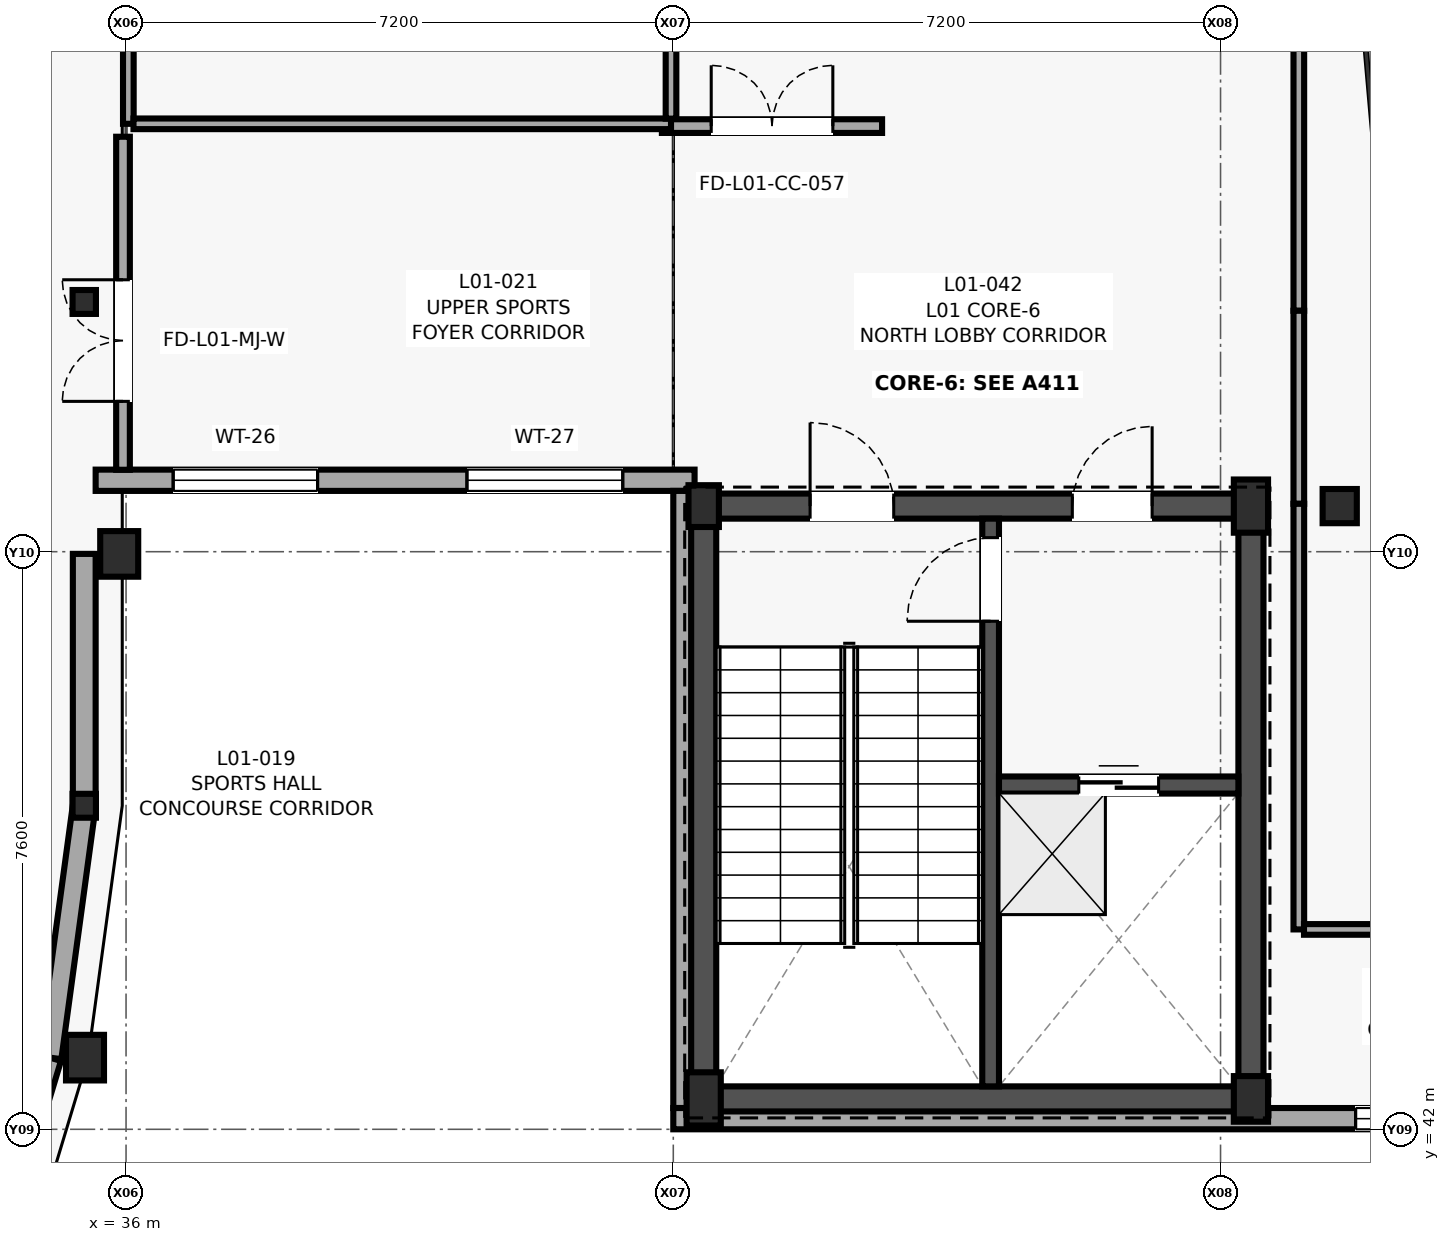
"""IFC4 building model, lengths in metres.
Left out: names, types, materials, properties, quantities, classifications, styles, units other than length and angle.
Written with IfcOpenShell. Run it as: python <this file> out.ifc"""

import sys

from ifc_helpers import new_model, si_unit, direction, frame, frame_2d, origin, origin_2d, place, context, subcontext, project, spatial, rectangle, circle, i_section, extrude, element, fill, save


model = new_model("IFC4")
c1 = context("Model", 3, precision=1e-05, world=origin(), true_north=direction((0.0, 1.0)))
c2 = subcontext(c1, "Body", "Model", "MODEL_VIEW")
j1 = project(units=[si_unit("LENGTHUNIT", "METRE"), si_unit("PLANEANGLEUNIT", "RADIAN")], contexts=[c1])
p1 = place(None, origin())
s1 = spatial("IfcSite", under=j1, at=p1, CompositionType="ELEMENT")
p2 = place(p1, origin())
s2 = spatial("IfcBuilding", under=s1, at=p2, CompositionType="ELEMENT")
p3 = place(p2, frame((0.0, 0.0, 4.2)))
s3 = spatial("IfcBuildingStorey", under=s2, at=p3, CompositionType="ELEMENT", Elevation=4.2)
for number, where, z_axis, x_axis in (
    (1, (35.45, 46.257, 0.0), (0.0, 0.0, 1.0), (1.0, 0.0, 0.0)),
    (2, (35.45, 52.886, 0.0), (0.0, 0.0, 1.0), (1.0, 0.0, 0.0)),
):
    element("IfcColumn", number, at=place(p3, frame(where, z_axis=z_axis, x_axis=x_axis)), inside=s3, PredefinedType="COLUMN", context=c2, shape_type="SweptSolid", body=[
        extrude(i_section(OverallWidth=0.307, OverallDepth=0.314, WebThickness=0.012, FlangeThickness=0.019, FilletRadius=0.015, at=origin_2d()), origin(), (0.0, 0.0, 1.0), 4.0),
    ])
for number, where, z_axis, x_axis in (
    (3, (35.46, 42.943, 0.0), (0.0, 0.0, 1.0), (1.0, 0.0, 0.0)),
    (4, (35.91, 49.571, 0.0), (0.0, 0.0, 1.0), (1.0, 0.0, 0.0)),
):
    element("IfcColumn", number, at=place(p3, frame(where, z_axis=z_axis, x_axis=x_axis)), inside=s3, PredefinedType="PILASTER", context=c2, shape_type="SweptSolid", body=[
        extrude(rectangle(XDim=0.5, YDim=0.6, at=origin_2d()), origin(), (0.0, 0.0, 1.0), 4.0),
    ])
p4 = place(p3, frame((43.6, 42.4, 0.0), z_axis=(0.0, 0.0, 1.0), x_axis=(1.0, 0.0, 0.0)))
e5 = element("IfcColumn", 5, at=p4, inside=s3, PredefinedType="COLUMN", context=c2, shape_type="SweptSolid", body=[
    extrude(rectangle(XDim=0.45, YDim=0.7, at=origin_2d()), origin(), (0.0, 0.0, 1.0), 4.0),
])
p5 = place(p3, frame((43.6, 50.2, 0.0), z_axis=(0.0, 0.0, 1.0), x_axis=(1.0, 0.0, 0.0)))
e6 = element("IfcColumn", 6, at=p5, inside=s3, PredefinedType="COLUMN", context=c2, shape_type="SweptSolid", body=[
    extrude(rectangle(XDim=0.4, YDim=0.55, at=origin_2d()), origin(), (0.0, 0.0, 1.0), 4.0),
])
p6 = place(p3, frame((50.8, 42.4, 0.0), z_axis=(0.0, 0.0, 1.0), x_axis=(1.0, 0.0, 0.0)))
e7 = element("IfcColumn", 7, at=p6, inside=s3, PredefinedType="COLUMN", context=c2, shape_type="SweptSolid", body=[
    extrude(rectangle(XDim=0.45, YDim=0.6, at=origin_2d()), origin(), (0.0, 0.0, 1.0), 4.0),
])
p7 = place(p3, frame((50.8, 50.2, 0.0), z_axis=(0.0, 0.0, 1.0), x_axis=(1.0, 0.0, 0.0)))
e8 = element("IfcColumn", 8, at=p7, inside=s3, PredefinedType="COLUMN", context=c2, shape_type="SweptSolid", body=[
    extrude(rectangle(XDim=0.45, YDim=0.7, at=origin_2d()), origin(), (0.0, 0.0, 1.0), 4.0),
])
p8 = place(p3, frame((51.968, 50.2, 0.0), z_axis=(0.0, 0.0, 1.0), x_axis=(1.0, 0.0, 0.0)))
e9 = element("IfcColumn", 9, at=p8, inside=s3, PredefinedType="COLUMN", context=c2, shape_type="SweptSolid", body=[
    extrude(circle(Radius=0.225, at=origin_2d()), origin(), (0.0, 0.0, 1.0), 4.0),
])
p9 = place(p3, frame((34.0, 39.629, 0.0), z_axis=(0.0, 0.0, 1.0), x_axis=(0.288868004026, 0.957368934241, 0.0)))
e10 = element("IfcWall", 10, at=p9, inside=s3, PredefinedType="SOLIDWALL", context=c2, shape_type="SweptSolid", body=[
    extrude(rectangle(XDim=3.462, YDim=0.3, at=frame_2d((1.731, 0.0))), origin(), (0.0, 0.0, 1.0), 3.745),
])
p10 = place(p3, frame((35.0, 42.943, 0.0), z_axis=(0.0, 0.0, 1.0), x_axis=(0.134539839792, 0.990908185206, 0.0)))
e11 = element("IfcWall", 11, at=p10, inside=s3, PredefinedType="SOLIDWALL", context=c2, shape_type="SweptSolid", body=[
    extrude(rectangle(XDim=3.344, YDim=0.3, at=frame_2d((1.672, 0.0))), origin(), (0.0, 0.0, 1.0), 3.745),
])
p11 = place(p3, frame((35.45, 46.257, 0.0), z_axis=(0.0, 0.0, 1.0), x_axis=(0.0, 1.0, 0.0)))
e12 = element("IfcWall", 12, at=p11, inside=s3, PredefinedType="SOLIDWALL", context=c2, shape_type="SweptSolid", body=[
    extrude(rectangle(XDim=3.314, YDim=0.3, at=frame_2d((1.657, 0.0))), origin(), (0.0, 0.0, 1.0), 3.48),
])
p12 = place(p3, frame((35.6, 50.54, 0.0), z_axis=(0.0, 0.0, 1.0), x_axis=(1.0, 0.0, 0.0)))
e13 = element("IfcWall", 13, at=p12, inside=s3, PredefinedType="SOLIDWALL", context=c2, shape_type="SweptSolid", body=[
    extrude(rectangle(XDim=7.88, YDim=0.28, at=frame_2d((3.94, 0.0))), origin(), (0.0, 0.0, 1.0), 3.78),
])
p13 = place(p12, frame((1.02, 0.0, 0.85)))
e14 = element("IfcOpeningElement", 14, at=p13, cuts=e13, PredefinedType="OPENING", context=c2, shape_type="SweptSolid", body=[
    extrude(rectangle(XDim=1.9, YDim=1.65, at=frame_2d((0.95, 0.825))), frame((0.0, 0.15, 0.0), z_axis=(0.0, -1.0, 0.0), x_axis=(1.0, 0.0, 0.0)), (0.0, 0.0, 1.0), 0.3),
])
p14 = place(p12, frame((4.885, 0.0, 1.05)))
e15 = element("IfcOpeningElement", 15, at=p14, cuts=e13, PredefinedType="OPENING", context=c2, shape_type="SweptSolid", body=[
    extrude(rectangle(XDim=2.05, YDim=1.55, at=frame_2d((1.025, 0.775))), frame((0.0, 0.15, 0.0), z_axis=(0.0, -1.0, 0.0), x_axis=(1.0, 0.0, 0.0)), (0.0, 0.0, 1.0), 0.3),
])
p15 = place(p3, frame((43.34, 50.4, 0.0), z_axis=(0.0, 0.0, 1.0), x_axis=(0.0, -1.0, 0.0)))
e16 = element("IfcWall", 16, at=p15, inside=s3, PredefinedType="SOLIDWALL", context=c2, shape_type="SweptSolid", body=[
    extrude(rectangle(XDim=8.12, YDim=0.28, at=frame_2d((4.06, 0.0))), origin(), (0.0, 0.0, 1.0), 3.78),
])
p16 = place(p3, frame((43.2, 42.14, 0.0), z_axis=(0.0, 0.0, 1.0), x_axis=(1.0, 0.0, 0.0)))
e17 = element("IfcWall", 17, at=p16, inside=s3, PredefinedType="SOLIDWALL", context=c2, shape_type="SweptSolid", body=[
    extrude(rectangle(XDim=12.093, YDim=0.28, at=frame_2d((6.046, 0.0))), origin(), (0.0, 0.0, 1.0), 3.78),
])
p17 = place(p16, frame((8.977, 0.0, 1.05)))
e18 = element("IfcOpeningElement", 18, at=p17, cuts=e17, PredefinedType="OPENING", context=c2, shape_type="SweptSolid", body=[
    extrude(rectangle(XDim=2.2, YDim=1.35, at=frame_2d((1.1, 0.675))), frame((0.0, 0.15, 0.0), z_axis=(0.0, -1.0, 0.0), x_axis=(1.0, 0.0, 0.0)), (0.0, 0.0, 1.0), 0.3),
])
p18 = place(p3, frame((43.435, 42.4, 0.0), z_axis=(0.0, 0.0, 1.0), x_axis=(1.0, 0.0, 0.0)))
e19 = element("IfcWall", 19, at=p18, inside=s3, PredefinedType="SHEAR", context=c2, shape_type="SweptSolid", body=[
    extrude(rectangle(XDim=7.53, YDim=0.33, at=frame_2d((3.765, 0.0))), origin(), (0.0, 0.0, 1.0), 3.78),
])
p19 = place(p3, frame((43.435, 50.2, 0.0), z_axis=(0.0, 0.0, 1.0), x_axis=(1.0, 0.0, 0.0)))
e20 = element("IfcWall", 20, at=p19, inside=s3, PredefinedType="SHEAR", context=c2, shape_type="SweptSolid", body=[
    extrude(rectangle(XDim=7.53, YDim=0.33, at=frame_2d((3.765, 0.0))), origin(), (0.0, 0.0, 1.0), 3.78),
])
p20 = place(p19, frame((5.015, 0.0, 0.0)))
e21 = element("IfcOpeningElement", 21, at=p20, cuts=e20, PredefinedType="OPENING", context=c2, shape_type="SweptSolid", body=[
    extrude(rectangle(XDim=1.05, YDim=2.15, at=frame_2d((0.525, 1.075))), frame((0.0, 0.175, 0.0), z_axis=(0.0, -1.0, 0.0), x_axis=(1.0, 0.0, 0.0)), (0.0, 0.0, 1.0), 0.35),
])
p21 = place(p19, frame((1.565, 0.0, 0.0)))
e22 = element("IfcOpeningElement", 22, at=p21, cuts=e20, PredefinedType="OPENING", context=c2, shape_type="SweptSolid", body=[
    extrude(rectangle(XDim=1.1, YDim=2.15, at=frame_2d((0.55, 1.075))), frame((0.0, 0.175, 0.0), z_axis=(0.0, -1.0, 0.0), x_axis=(1.0, 0.0, 0.0)), (0.0, 0.0, 1.0), 0.35),
])
for number, where, z_axis, x_axis in (
    (23, (43.6, 42.565, 0.0), (0.0, 0.0, 1.0), (0.0, 1.0, 0.0)),
    (24, (50.8, 42.565, 0.0), (0.0, 0.0, 1.0), (0.0, 1.0, 0.0)),
):
    element("IfcWall", number, at=place(p3, frame(where, z_axis=z_axis, x_axis=x_axis)), inside=s3, PredefinedType="SHEAR", context=c2, shape_type="SweptSolid", body=[
        extrude(rectangle(XDim=7.47, YDim=0.33, at=frame_2d((3.735, 0.0))), origin(), (0.0, 0.0, 1.0), 3.78),
    ])
p22 = place(p3, frame((47.375, 42.565, 0.0), z_axis=(0.0, 0.0, 1.0), x_axis=(0.0, 1.0, 0.0)))
e25 = element("IfcWall", 25, at=p22, inside=s3, PredefinedType="SHEAR", context=c2, shape_type="SweptSolid", body=[
    extrude(rectangle(XDim=7.47, YDim=0.22, at=frame_2d((3.735, 0.0))), origin(), (0.0, 0.0, 1.0), 3.78),
])
p23 = place(p22, frame((6.12, 0.0, 0.0)))
e26 = element("IfcOpeningElement", 26, at=p23, cuts=e25, PredefinedType="OPENING", context=c2, shape_type="SweptSolid", body=[
    extrude(rectangle(XDim=1.1, YDim=2.15, at=frame_2d((0.55, 1.075))), frame((0.0, 0.12, 0.0), z_axis=(0.0, -1.0, 0.0), x_axis=(1.0, 0.0, 0.0)), (0.0, 0.0, 1.0), 0.24),
])
p24 = place(p3, frame((47.485, 46.53, 0.0), z_axis=(0.0, 0.0, 1.0), x_axis=(1.0, 0.0, 0.0)))
e27 = element("IfcWall", 27, at=p24, inside=s3, PredefinedType="SHEAR", context=c2, shape_type="SweptSolid", body=[
    extrude(rectangle(XDim=3.15, YDim=0.225, at=frame_2d((1.575, 0.0))), origin(), (0.0, 0.0, 1.0), 3.78),
])
p25 = place(p24, frame((1.05, 0.0, 0.0)))
e28 = element("IfcOpeningElement", 28, at=p25, cuts=e27, PredefinedType="OPENING", context=c2, shape_type="SweptSolid", body=[
    extrude(rectangle(XDim=1.05, YDim=2.2, at=frame_2d((0.525, 1.1))), frame((0.0, 0.123, 0.0), z_axis=(0.0, -1.0, 0.0), x_axis=(1.0, 0.0, 0.0)), (0.0, 0.0, 1.0), 0.245),
])
p26 = place(p3, frame((35.96, 50.678, 0.0), z_axis=(0.0, 0.0, 1.0), x_axis=(0.0, 1.0, 0.0)))
e29 = element("IfcWall", 29, at=p26, inside=s3, PredefinedType="PARTITIONING", context=c2, shape_type="SweptSolid", body=[
    extrude(rectangle(XDim=4.382, YDim=0.18, at=frame_2d((2.191, 0.0))), origin(), (0.0, 0.0, 1.0), 3.78),
])
p27 = place(p26, frame((0.9, 0.0, 0.0)))
e30 = element("IfcOpeningElement", 30, at=p27, cuts=e29, PredefinedType="OPENING", context=c2, shape_type="SweptSolid", body=[
    extrude(rectangle(XDim=1.6, YDim=2.25, at=frame_2d((0.8, 1.125))), frame((0.0, 0.1, 0.0), z_axis=(0.0, -1.0, 0.0), x_axis=(1.0, 0.0, 0.0)), (0.0, 0.0, 1.0), 0.2),
])
p28 = place(p3, frame((43.05, 55.2, 0.0), z_axis=(0.0, 0.0, 1.0), x_axis=(1.0, 0.0, 0.0)))
e31 = element("IfcWall", 31, at=p28, inside=s3, PredefinedType="PARTITIONING", context=c2, shape_type="SweptSolid", body=[
    extrude(rectangle(XDim=2.897, YDim=0.18, at=frame_2d((1.448, 0.0))), origin(), (0.0, 0.0, 1.0), 3.78),
])
p29 = place(p28, frame((0.649, 0.0, 0.0)))
e32 = element("IfcOpeningElement", 32, at=p29, cuts=e31, PredefinedType="OPENING", context=c2, shape_type="SweptSolid", body=[
    extrude(rectangle(XDim=1.6, YDim=2.25, at=frame_2d((0.8, 1.125))), frame((0.0, 0.1, 0.0), z_axis=(0.0, -1.0, 0.0), x_axis=(1.0, 0.0, 0.0)), (0.0, 0.0, 1.0), 0.2),
])
p30 = place(p3, frame((36.03, 63.722, 0.0), z_axis=(0.0, 0.0, 1.0), x_axis=(0.0, -1.0, 0.0)))
e33 = element("IfcWall", 33, at=p30, inside=s3, PredefinedType="PARTITIONING", context=c2, shape_type="SweptSolid", body=[
    extrude(rectangle(XDim=8.492, YDim=0.14, at=frame_2d((4.246, 0.0))), origin(), (0.0, 0.0, 1.0), 3.76),
])
p31 = place(p30, frame((2.535, 0.0, 0.0)))
e34 = element("IfcOpeningElement", 34, at=p31, cuts=e33, PredefinedType="OPENING", context=c2, shape_type="SweptSolid", body=[
    extrude(rectangle(XDim=1.25, YDim=2.22, at=frame_2d((0.625, 1.11))), frame((0.0, 0.08, 0.0), z_axis=(0.0, -1.0, 0.0), x_axis=(1.0, 0.0, 0.0)), (0.0, 0.0, 1.0), 0.16),
])
p32 = place(p3, frame((36.098, 55.23, 0.0), z_axis=(0.0, 0.0, 1.0), x_axis=(1.0, 0.0, 0.0)))
e35 = element("IfcWall", 35, at=p32, inside=s3, PredefinedType="PARTITIONING", context=c2, shape_type="SweptSolid", body=[
    extrude(rectangle(XDim=7.072, YDim=0.14, at=frame_2d((3.536, 0.0))), origin(), (0.0, 0.0, 1.0), 3.76),
])
p33 = place(p3, frame((43.17, 55.298, 0.0), z_axis=(0.0, 0.0, 1.0), x_axis=(0.0, 1.0, 0.0)))
e36 = element("IfcWall", 36, at=p33, inside=s3, PredefinedType="PARTITIONING", context=c2, shape_type="SweptSolid", body=[
    extrude(rectangle(XDim=8.424, YDim=0.14, at=frame_2d((4.212, 0.0))), origin(), (0.0, 0.0, 1.0), 3.175),
])
p34 = place(p3, frame((52.475, 55.135, 0.0), z_axis=(0.0, 0.0, 1.0), x_axis=(-0.086916960031, 0.996215560037, 0.0)))
e37 = element("IfcWall", 37, at=p34, inside=s3, PredefinedType="PARTITIONING", context=c2, shape_type="SweptSolid", body=[
    extrude(rectangle(XDim=1.393, YDim=0.14, at=frame_2d((0.697, 0.0))), origin(), (0.0, 0.0, 1.0), 3.775),
])
p35 = place(p3, frame((51.43, 56.77, 0.0), z_axis=(0.0, 0.0, 1.0), x_axis=(0.0, -1.0, 0.0)))
e38 = element("IfcWall", 38, at=p35, inside=s3, PredefinedType="PARTITIONING", context=c2, shape_type="SweptSolid", body=[
    extrude(rectangle(XDim=4.0, YDim=0.14, at=frame_2d((2.0, 0.0))), origin(), (0.0, 0.0, 1.0), 3.775),
])
p36 = place(p3, frame((51.43, 52.77, 0.0), z_axis=(0.0, 0.0, 1.0), x_axis=(0.0, -1.0, 0.0)))
e39 = element("IfcWall", 39, at=p36, inside=s3, PredefinedType="PARTITIONING", context=c2, shape_type="SweptSolid", body=[
    extrude(rectangle(XDim=2.54, YDim=0.14, at=frame_2d((1.27, 0.0))), origin(), (0.0, 0.0, 1.0), 3.775),
])
p37 = place(p3, frame((51.43, 50.23, 0.0), z_axis=(0.0, 0.0, 1.0), x_axis=(0.0, -1.0, 0.0)))
e40 = element("IfcWall", 40, at=p37, inside=s3, PredefinedType="PARTITIONING", context=c2, shape_type="SweptSolid", body=[
    extrude(rectangle(XDim=5.6, YDim=0.14, at=frame_2d((2.8, 0.0))), origin(), (0.0, 0.0, 1.0), 3.775),
])
p38 = place(p3, frame((51.498, 44.63, 0.0), z_axis=(0.0, 0.0, 1.0), x_axis=(1.0, 0.0, 0.0)))
e41 = element("IfcWall", 41, at=p38, inside=s3, PredefinedType="PARTITIONING", context=c2, shape_type="SweptSolid", body=[
    extrude(rectangle(XDim=11.872, YDim=0.14, at=frame_2d((5.936, 0.0))), origin(), (0.0, 0.0, 1.0), 3.775),
])
p39 = place(p38, frame((5.436, 0.0, 0.0)))
e42 = element("IfcOpeningElement", 42, at=p39, cuts=e41, PredefinedType="OPENING", context=c2, shape_type="SweptSolid", body=[
    extrude(rectangle(XDim=1.0, YDim=2.1, at=frame_2d((0.5, 1.05))), frame((0.0, 0.08, 0.0), z_axis=(0.0, -1.0, 0.0), x_axis=(1.0, 0.0, 0.0)), (0.0, 0.0, 1.0), 0.16),
])
p40 = place(p38, frame((7.136, 0.0, 1.05)))
e43 = element("IfcOpeningElement", 43, at=p40, cuts=e41, PredefinedType="OPENING", context=c2, shape_type="SweptSolid", body=[
    extrude(rectangle(XDim=1.8, YDim=1.2, at=frame_2d((0.9, 0.6))), frame((0.0, 0.08, 0.0), z_axis=(0.0, -1.0, 0.0), x_axis=(1.0, 0.0, 0.0)), (0.0, 0.0, 1.0), 0.16),
])
p41 = place(p13, origin())
e44 = element("IfcWindow", 44, at=p41, inside=s3, PartitioningType="SINGLE_PANEL", PredefinedType="WINDOW", context=c2, shape_type="SweptSolid", body=[
    extrude(rectangle(XDim=1.9, YDim=1.65, at=frame_2d((0.95, 0.825))), frame((0.0, 0.03, 0.0), z_axis=(0.0, -1.0, 0.0), x_axis=(1.0, 0.0, 0.0)), (0.0, 0.0, 1.0), 0.06),
])
fill(e14, e44)
p42 = place(p14, origin())
e45 = element("IfcWindow", 45, at=p42, inside=s3, PartitioningType="SINGLE_PANEL", PredefinedType="WINDOW", context=c2, shape_type="SweptSolid", body=[
    extrude(rectangle(XDim=2.05, YDim=1.55, at=frame_2d((1.025, 0.775))), frame((0.0, 0.03, 0.0), z_axis=(0.0, -1.0, 0.0), x_axis=(1.0, 0.0, 0.0)), (0.0, 0.0, 1.0), 0.06),
])
fill(e15, e45)
p43 = place(p17, origin())
e46 = element("IfcWindow", 46, at=p43, inside=s3, PartitioningType="SINGLE_PANEL", PredefinedType="WINDOW", context=c2, shape_type="SweptSolid", body=[
    extrude(rectangle(XDim=2.2, YDim=1.35, at=frame_2d((1.1, 0.675))), frame((0.0, 0.03, 0.0), z_axis=(0.0, -1.0, 0.0), x_axis=(1.0, 0.0, 0.0)), (0.0, 0.0, 1.0), 0.06),
])
fill(e18, e46)
p44 = place(p25, origin())
e47 = element("IfcDoor", 47, at=p44, inside=s3, OperationType="SLIDING_TO_LEFT", PredefinedType="DOOR", context=c2, shape_type="SweptSolid", body=[
    extrude(rectangle(XDim=1.05, YDim=2.2, at=frame_2d((0.525, 1.1))), frame((0.0, 0.025, 0.0), z_axis=(0.0, -1.0, 0.0), x_axis=(1.0, 0.0, 0.0)), (0.0, 0.0, 1.0), 0.05),
])
fill(e28, e47)
p45 = place(p23, origin())
e48 = element("IfcDoor", 48, at=p45, inside=s3, OperationType="SINGLE_SWING_LEFT", PredefinedType="DOOR", context=c2, shape_type="SweptSolid", body=[
    extrude(rectangle(XDim=1.1, YDim=2.15, at=frame_2d((0.55, 1.075))), frame((0.0, 0.025, 0.0), z_axis=(0.0, -1.0, 0.0), x_axis=(1.0, 0.0, 0.0)), (0.0, 0.0, 1.0), 0.05),
])
fill(e26, e48)
p46 = place(p20, origin())
e49 = element("IfcDoor", 49, at=p46, inside=s3, OperationType="SINGLE_SWING_RIGHT", PredefinedType="DOOR", context=c2, shape_type="SweptSolid", body=[
    extrude(rectangle(XDim=1.05, YDim=2.15, at=frame_2d((0.525, 1.075))), frame((0.0, 0.025, 0.0), z_axis=(0.0, -1.0, 0.0), x_axis=(1.0, 0.0, 0.0)), (0.0, 0.0, 1.0), 0.05),
])
fill(e21, e49)
p47 = place(p21, origin())
e50 = element("IfcDoor", 50, at=p47, inside=s3, OperationType="SINGLE_SWING_LEFT", PredefinedType="DOOR", context=c2, shape_type="SweptSolid", body=[
    extrude(rectangle(XDim=1.1, YDim=2.15, at=frame_2d((0.55, 1.075))), frame((0.0, 0.025, 0.0), z_axis=(0.0, -1.0, 0.0), x_axis=(1.0, 0.0, 0.0)), (0.0, 0.0, 1.0), 0.05),
])
fill(e22, e50)
p48 = place(p27, origin())
e51 = element("IfcDoor", 51, at=p48, inside=s3, OperationType="DOUBLE_DOOR_SINGLE_SWING", PredefinedType="DOOR", context=c2, shape_type="SweptSolid", body=[
    extrude(rectangle(XDim=1.6, YDim=2.25, at=frame_2d((0.8, 1.125))), frame((0.0, 0.025, 0.0), z_axis=(0.0, -1.0, 0.0), x_axis=(1.0, 0.0, 0.0)), (0.0, 0.0, 1.0), 0.05),
])
fill(e30, e51)
p49 = place(p29, origin())
e52 = element("IfcDoor", 52, at=p49, inside=s3, OperationType="DOUBLE_DOOR_SINGLE_SWING", PredefinedType="DOOR", context=c2, shape_type="SweptSolid", body=[
    extrude(rectangle(XDim=1.6, YDim=2.25, at=frame_2d((0.8, 1.125))), frame((0.0, 0.025, 0.0), z_axis=(0.0, -1.0, 0.0), x_axis=(1.0, 0.0, 0.0)), (0.0, 0.0, 1.0), 0.05),
])
fill(e32, e52)
save(model, sys.argv[1])
